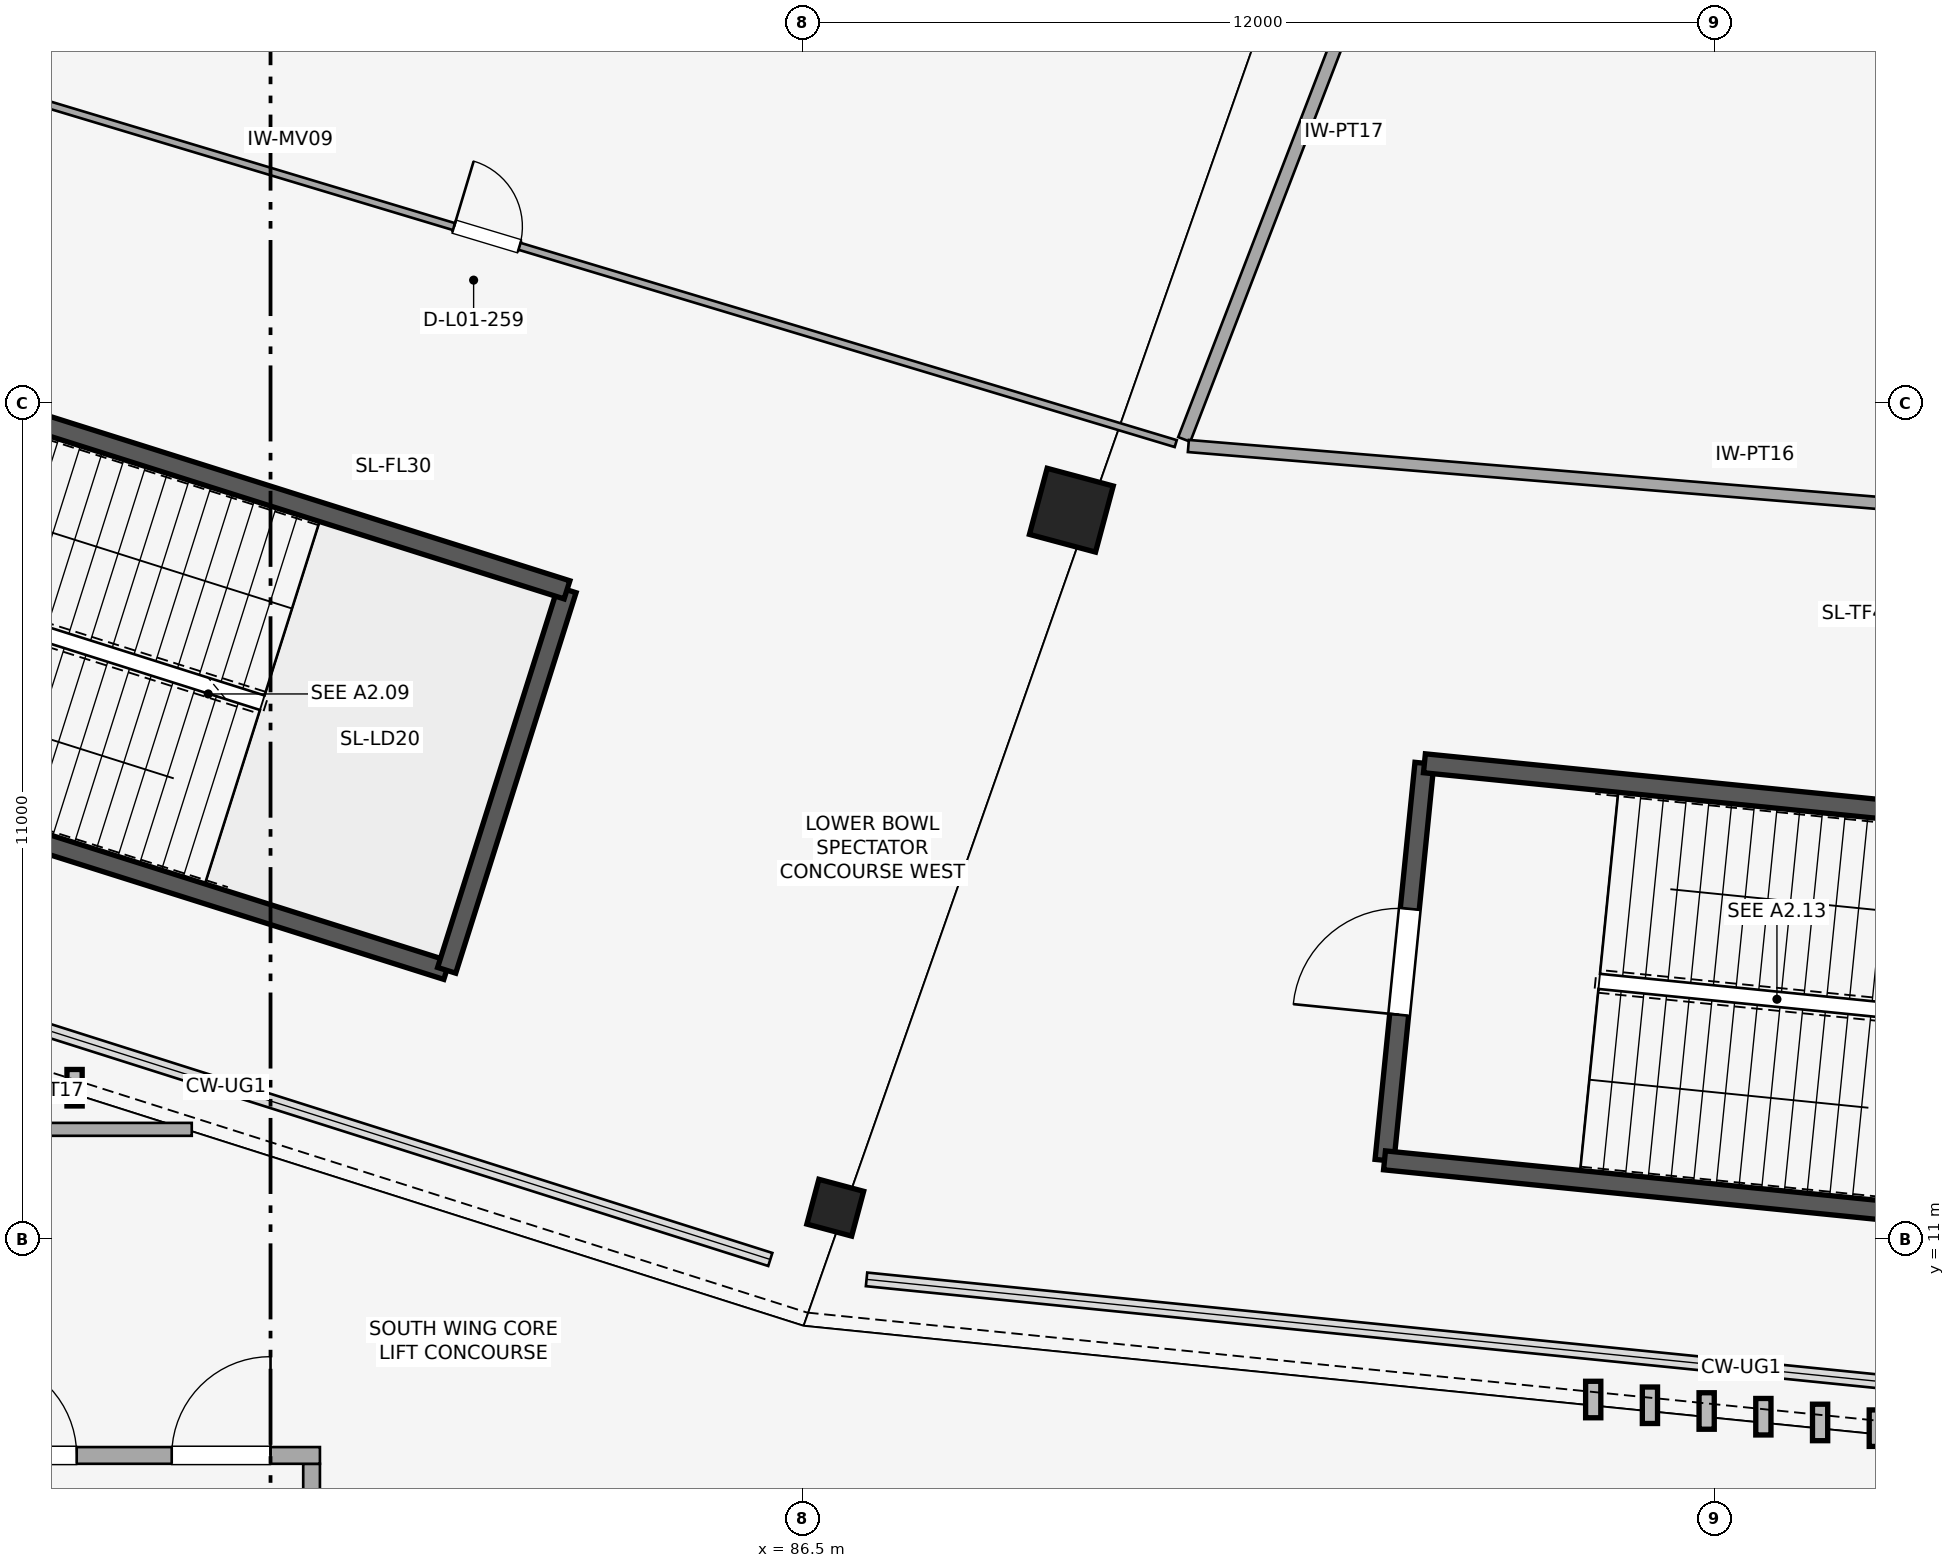
"""IFC4 building model, lengths in metres.
Left out: names, types, materials, properties, quantities, classifications, styles, units other than length and angle.
Written with IfcOpenShell. Run it as: python <this file> out.ifc"""

import sys

from ifc_helpers import new_model, si_unit, direction, frame, frame_2d, origin, origin_2d, place, context, subcontext, project, spatial, rectangle, hollow_circle, extrude, element, fill, save


model = new_model("IFC4")
c1 = context("Model", 3, precision=1e-05, world=origin(), true_north=direction((0.0, 1.0)))
c2 = subcontext(c1, "Body", "Model", "MODEL_VIEW")
j1 = project(units=[si_unit("LENGTHUNIT", "METRE"), si_unit("PLANEANGLEUNIT", "RADIAN")], contexts=[c1])
p1 = place(None, origin())
s1 = spatial("IfcSite", under=j1, at=p1, CompositionType="ELEMENT")
p2 = place(p1, origin())
s2 = spatial("IfcBuilding", under=s1, at=p2, CompositionType="ELEMENT")
p3 = place(p2, frame((0.0, 0.0, 5.4)))
s3 = spatial("IfcBuildingStorey", under=s2, at=p3, CompositionType="ELEMENT", Elevation=5.4)
p4 = place(p3, frame((90.036, 20.596, 0.0), z_axis=(0.0, 0.0, 1.0), x_axis=(-0.258819045103, -0.965925826289, 0.0)))
e1 = element("IfcColumn", 1, at=p4, inside=s3, PredefinedType="COLUMN", context=c2, shape_type="SweptSolid", body=[
    extrude(rectangle(XDim=0.9, YDim=0.9, at=origin_2d()), origin(), (0.0, 0.0, 1.0), 5.2),
])
p5 = place(p3, frame((86.93, 11.419, 0.0), z_axis=(0.0, 0.0, 1.0), x_axis=(-0.258819045103, -0.965925826289, 0.0)))
e2 = element("IfcColumn", 2, at=p5, inside=s3, PredefinedType="COLUMN", context=c2, shape_type="SweptSolid", body=[
    extrude(hollow_circle(Radius=0.305, WallThickness=0.03, at=origin_2d()), origin(), (0.0, 0.0, 1.0), 5.2),
])
p6 = place(p3, frame((71.854, 17.693, 0.0), z_axis=(0.0, 0.0, 1.0), x_axis=(0.953461834254, -0.301513732061, 0.0)))
e3 = element("IfcWall", 3, at=p6, inside=s3, PredefinedType="SHEAR", context=c2, shape_type="SweptSolid", body=[
    extrude(rectangle(XDim=10.45, YDim=0.25, at=frame_2d((5.225, 0.0))), origin(), (0.0, 0.0, 1.0), 4.92),
])
p7 = place(p3, frame((81.818, 14.542, 0.0), z_axis=(0.0, 0.0, 1.0), x_axis=(0.301485222482, 0.953470849384, 0.0)))
e4 = element("IfcWall", 4, at=p7, inside=s3, PredefinedType="SHEAR", context=c2, shape_type="SweptSolid", body=[
    extrude(rectangle(XDim=5.25, YDim=0.25, at=frame_2d((2.625, 0.0))), origin(), (0.0, 0.0, 1.0), 4.92),
])
p8 = place(p3, frame((83.4, 19.548, 0.0), z_axis=(0.0, 0.0, 1.0), x_axis=(-0.953459710305, 0.301520448438, 0.0)))
e5 = element("IfcWall", 5, at=p8, inside=s3, PredefinedType="SHEAR", context=c2, shape_type="SweptSolid", body=[
    extrude(rectangle(XDim=10.45, YDim=0.25, at=frame_2d((5.225, 0.0))), origin(), (0.0, 0.0, 1.0), 4.92),
])
p9 = place(p3, frame((94.681, 17.266, 0.0), z_axis=(0.0, 0.0, 1.0), x_axis=(-0.10002396577, -0.994985028165, 0.0)))
e6 = element("IfcWall", 6, at=p9, inside=s3, PredefinedType="SHEAR", context=c2, shape_type="SweptSolid", body=[
    extrude(rectangle(XDim=5.25, YDim=0.25, at=frame_2d((2.625, 0.0))), origin(), (0.0, 0.0, 1.0), 4.92),
])
p10 = place(p9, frame((1.925, 0.0, 0.0)))
e7 = element("IfcOpeningElement", 7, at=p10, cuts=e6, PredefinedType="OPENING", context=c2, shape_type="SweptSolid", body=[
    extrude(rectangle(XDim=1.4, YDim=2.2, at=frame_2d((0.7, 1.1))), frame((0.0, 0.135, 0.0), z_axis=(0.0, -1.0, 0.0), x_axis=(1.0, 0.0, 0.0)), (0.0, 0.0, 1.0), 0.27),
])
p11 = place(p3, frame((94.156, 12.042, 0.0), z_axis=(0.0, 0.0, 1.0), x_axis=(0.994988263568, -0.09999177647, 0.0)))
e8 = element("IfcWall", 8, at=p11, inside=s3, PredefinedType="SHEAR", context=c2, shape_type="SweptSolid", body=[
    extrude(rectangle(XDim=10.45, YDim=0.25, at=frame_2d((5.225, 0.0))), origin(), (0.0, 0.0, 1.0), 4.92),
])
p12 = place(p3, frame((105.078, 16.221, 0.0), z_axis=(0.0, 0.0, 1.0), x_axis=(-0.994985705245, 0.100017230303, 0.0)))
e9 = element("IfcWall", 9, at=p12, inside=s3, PredefinedType="SHEAR", context=c2, shape_type="SweptSolid", body=[
    extrude(rectangle(XDim=10.45, YDim=0.25, at=frame_2d((5.225, 0.0))), origin(), (0.0, 0.0, 1.0), 4.92),
])
p13 = place(p3, frame((80.04, 4.52, 0.0), z_axis=(0.0, 0.0, 1.0), x_axis=(0.0, 1.0, 0.0)))
e10 = element("IfcWall", 10, at=p13, inside=s3, PredefinedType="PARTITIONING", context=c2, shape_type="SweptSolid", body=[
    extrude(rectangle(XDim=3.53, YDim=0.22, at=frame_2d((1.765, 0.0))), origin(), (0.0, 0.0, 1.0), 3.67),
])
p14 = place(p3, frame((75.0, 8.16, 0.0), z_axis=(0.0, 0.0, 1.0), x_axis=(1.0, 0.0, 0.0)))
e11 = element("IfcWall", 11, at=p14, inside=s3, PredefinedType="PARTITIONING", context=c2, shape_type="SweptSolid", body=[
    extrude(rectangle(XDim=5.15, YDim=0.22, at=frame_2d((2.575, 0.0))), origin(), (0.0, 0.0, 1.0), 3.67),
])
p15 = place(p14, frame((0.65, 0.0, 0.0)))
e12 = element("IfcOpeningElement", 12, at=p15, cuts=e11, PredefinedType="OPENING", context=c2, shape_type="SweptSolid", body=[
    extrude(rectangle(XDim=1.3, YDim=2.2, at=frame_2d((0.65, 1.1))), frame((0.0, 0.12, 0.0), z_axis=(0.0, -1.0, 0.0), x_axis=(1.0, 0.0, 0.0)), (0.0, 0.0, 1.0), 0.24),
])
p16 = place(p14, frame((3.2, 0.0, 0.0)))
e13 = element("IfcOpeningElement", 13, at=p16, cuts=e11, PredefinedType="OPENING", context=c2, shape_type="SweptSolid", body=[
    extrude(rectangle(XDim=1.3, YDim=2.2, at=frame_2d((0.65, 1.1))), frame((0.0, 0.12, 0.0), z_axis=(0.0, -1.0, 0.0), x_axis=(1.0, 0.0, 0.0)), (0.0, 0.0, 1.0), 0.24),
])
p17 = place(p3, frame((73.28, 26.922, 0.0), z_axis=(0.0, 0.0, 1.0), x_axis=(0.957658583418, -0.287906300046, 0.0)))
e14 = element("IfcWall", 14, at=p17, inside=s3, PredefinedType="MOVABLE", context=c2, shape_type="SweptSolid", body=[
    extrude(rectangle(XDim=18.93, YDim=0.095, at=frame_2d((9.465, 0.0))), origin(), (0.0, 0.0, 1.0), 3.67),
])
p18 = place(p17, frame((9.015, 0.0, 0.0)))
e15 = element("IfcOpeningElement", 15, at=p18, cuts=e14, PredefinedType="OPENING", context=c2, shape_type="SweptSolid", body=[
    extrude(rectangle(XDim=0.9, YDim=2.1, at=frame_2d((0.45, 1.05))), frame((0.0, 0.057, 0.0), z_axis=(0.0, -1.0, 0.0), x_axis=(1.0, 0.0, 0.0)), (0.0, 0.0, 1.0), 0.115),
])
p19 = place(p3, frame((94.778, 29.982, 0.0), z_axis=(0.0, 0.0, 1.0), x_axis=(-0.359430415578, -0.933171890038, 0.0)))
e16 = element("IfcWall", 16, at=p19, inside=s3, PredefinedType="PARTITIONING", context=c2, shape_type="SweptSolid", body=[
    extrude(rectangle(XDim=9.061, YDim=0.17, at=frame_2d((4.531, 0.0))), origin(), (0.0, 0.0, 1.0), 3.67),
])
p20 = place(p3, frame((91.575, 21.44, 0.0), z_axis=(0.0, 0.0, 1.0), x_axis=(0.996606098427, -0.082318191055, 0.0)))
e17 = element("IfcWall", 17, at=p20, inside=s3, PredefinedType="PARTITIONING", context=c2, shape_type="SweptSolid", body=[
    extrude(rectangle(XDim=21.253, YDim=0.16, at=frame_2d((10.626, 0.0))), origin(), (0.0, 0.0, 1.0), 3.67),
])
p21 = place(p20, frame((10.087, 0.0, 0.0)))
e18 = element("IfcOpeningElement", 18, at=p21, cuts=e17, PredefinedType="OPENING", context=c2, shape_type="SweptSolid", body=[
    extrude(rectangle(XDim=1.08, YDim=2.1, at=frame_2d((0.54, 1.05))), frame((0.0, 0.09, 0.0), z_axis=(0.0, -1.0, 0.0), x_axis=(1.0, 0.0, 0.0)), (0.0, 0.0, 1.0), 0.18),
])
p22 = place(p3, frame((74.585, 12.45, 0.0), z_axis=(0.0, 0.0, 1.0), x_axis=(1.0, 0.0, 0.0)))
e19 = element("IfcWall", 19, at=p22, inside=s3, PredefinedType="PARTITIONING", context=c2, shape_type="SweptSolid", body=[
    extrude(rectangle(XDim=3.879, YDim=0.17, at=frame_2d((1.939, 0.0))), origin(), (0.0, 0.0, 1.0), 3.67),
])
p23 = place(p10, frame((1.4, 0.0, 0.0), z_axis=(0.0, 0.0, 1.0), x_axis=(-1.0, 0.0, 0.0)))
e20 = element("IfcDoor", 20, at=p23, inside=s3, OperationType="SINGLE_SWING_LEFT", PredefinedType="DOOR", context=c2, shape_type="SweptSolid", body=[
    extrude(rectangle(XDim=1.4, YDim=2.2, at=frame_2d((0.7, 1.1))), frame((0.0, 0.025, 0.0), z_axis=(0.0, -1.0, 0.0), x_axis=(1.0, 0.0, 0.0)), (0.0, 0.0, 1.0), 0.05),
])
fill(e7, e20)
p24 = place(p15, origin())
e21 = element("IfcDoor", 21, at=p24, inside=s3, OperationType="SINGLE_SWING_LEFT", PredefinedType="DOOR", context=c2, shape_type="SweptSolid", body=[
    extrude(rectangle(XDim=1.3, YDim=2.2, at=frame_2d((0.65, 1.1))), frame((0.0, 0.025, 0.0), z_axis=(0.0, -1.0, 0.0), x_axis=(1.0, 0.0, 0.0)), (0.0, 0.0, 1.0), 0.05),
])
fill(e12, e21)
p25 = place(p16, origin())
e22 = element("IfcDoor", 22, at=p25, inside=s3, OperationType="SINGLE_SWING_RIGHT", PredefinedType="DOOR", context=c2, shape_type="SweptSolid", body=[
    extrude(rectangle(XDim=1.3, YDim=2.2, at=frame_2d((0.65, 1.1))), frame((0.0, 0.025, 0.0), z_axis=(0.0, -1.0, 0.0), x_axis=(1.0, 0.0, 0.0)), (0.0, 0.0, 1.0), 0.05),
])
fill(e13, e22)
p26 = place(p18, origin())
e23 = element("IfcDoor", 23, at=p26, inside=s3, OperationType="SINGLE_SWING_LEFT", PredefinedType="DOOR", context=c2, shape_type="SweptSolid", body=[
    extrude(rectangle(XDim=0.9, YDim=2.1, at=frame_2d((0.45, 1.05))), frame((0.0, 0.025, 0.0), z_axis=(0.0, -1.0, 0.0), x_axis=(1.0, 0.0, 0.0)), (0.0, 0.0, 1.0), 0.05),
])
fill(e15, e23)
save(model, sys.argv[1])
